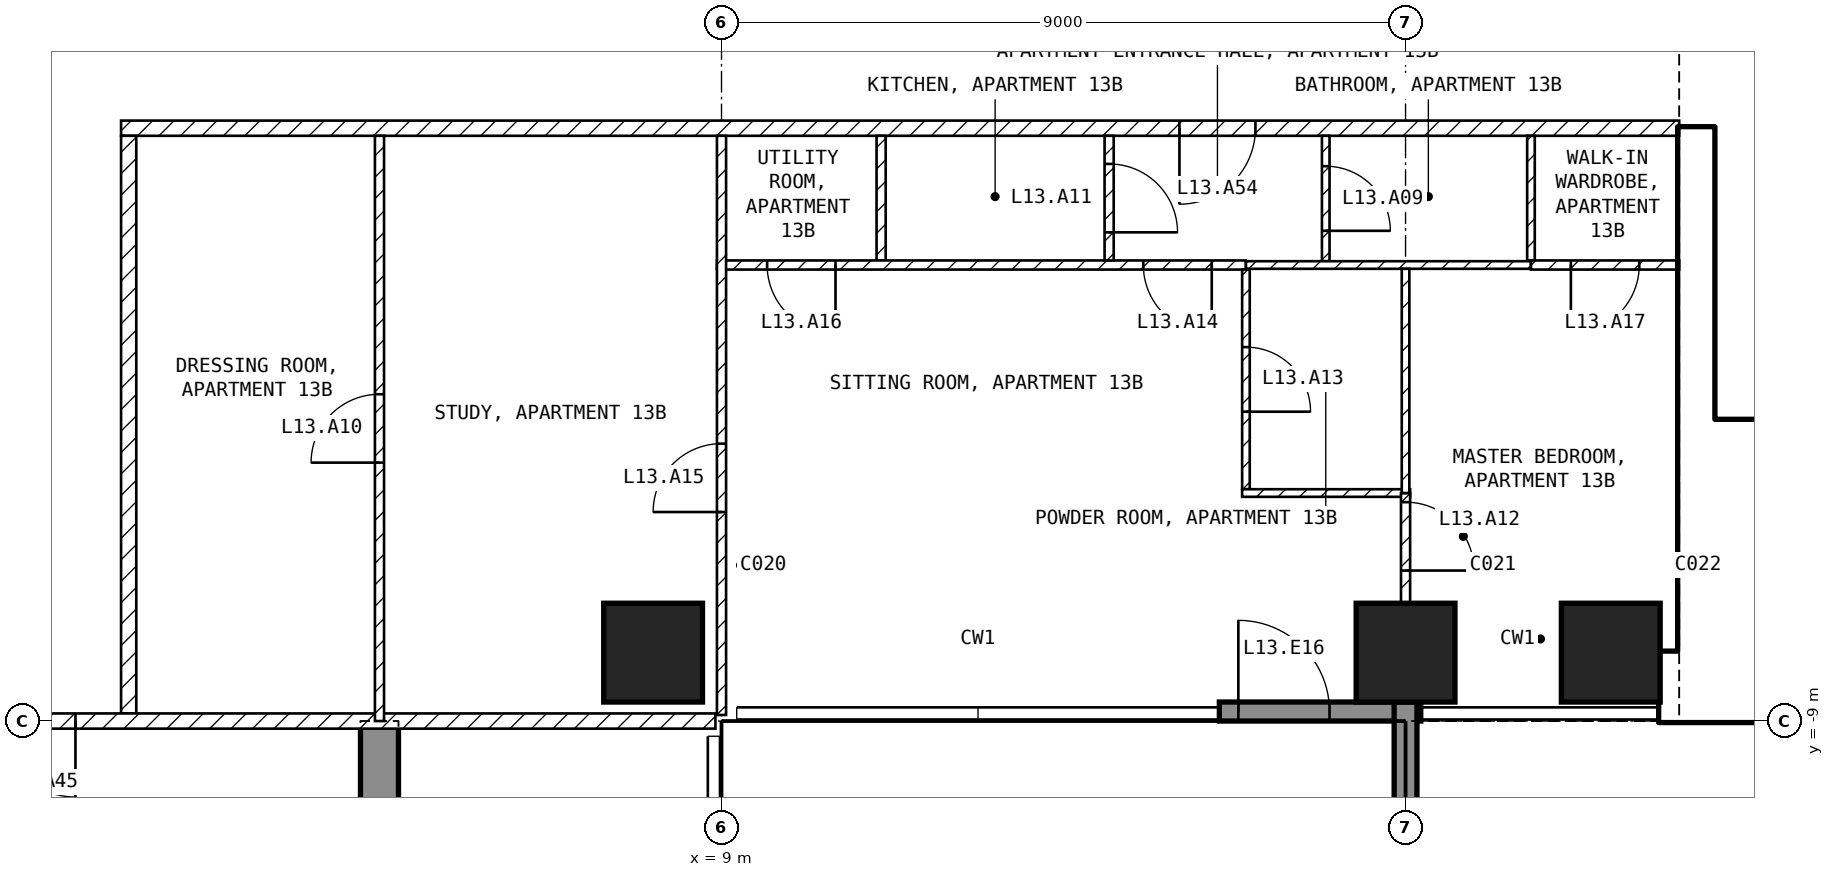
"""IFC4 building model, lengths in metres.
Left out: names, types, materials, properties, quantities, classifications, styles, units other than length and angle.
Written with IfcOpenShell. Run it as: python <this file> out.ifc"""

import sys

from ifc_helpers import new_model, si_unit, direction, frame, frame_2d, origin, origin_2d, place, context, subcontext, project, spatial, polyline, rectangle, outline, extrude, element, fill, save


model = new_model("IFC4")
c1 = context("Model", 3, precision=1e-05, world=origin(), true_north=direction((0.0, 1.0)))
c2 = subcontext(c1, "Body", "Model", "MODEL_VIEW")
j1 = project(units=[si_unit("LENGTHUNIT", "METRE"), si_unit("PLANEANGLEUNIT", "RADIAN")], contexts=[c1])
p1 = place(None, origin())
s1 = spatial("IfcSite", under=j1, at=p1, CompositionType="ELEMENT")
p2 = place(p1, origin())
s2 = spatial("IfcBuilding", under=s1, at=p2, CompositionType="ELEMENT")
p3 = place(p2, frame((0.0, 0.0, 64.5)))
s3 = spatial("IfcBuildingStorey", under=s2, at=p3, CompositionType="ELEMENT", Elevation=64.5)
for number, where, z_axis, x_axis in (
    (1, (8.1, -8.1, -0.25), (0.0, 0.0, 1.0), (1.0, 0.0, 0.0)),
    (2, (18.0, -8.1, -0.25), (0.0, 0.0, 1.0), (1.0, 0.0, 0.0)),
    (3, (20.7, -8.1, -0.25), (0.0, 0.0, 1.0), (1.0, 0.0, 0.0)),
):
    element("IfcColumn", number, at=place(p3, frame(where, z_axis=z_axis, x_axis=x_axis)), inside=s3, PredefinedType="COLUMN", context=c2, shape_type="SweptSolid", body=[
        extrude(rectangle(XDim=1.3, YDim=1.3, at=origin_2d()), origin(), (0.0, 0.0, 1.0), 3.5),
    ])
p4 = place(p3, frame((4.25, -25.45, -0.25), z_axis=(1.0, 0.0, 0.0), x_axis=(0.0, 1.0, 0.0)))
e4 = element("IfcWall", 4, at=p4, inside=s3, PredefinedType="SHEAR", context=c2, shape_type="SweptSolid", body=[
    extrude(outline(polyline([(0.0, 0.0), (4.15, 0.0), (4.15, 2.65), (6.55, 2.65), (6.55, 0.0), (11.95, 0.0), (11.95, 2.65), (14.35, 2.65), (14.35, 0.0), (16.45, 0.0), (16.45, 3.5), (0.0, 3.5), (0.0, 0.0)])), origin(), (0.0, 0.0, 1.0), 0.5),
])
p5 = place(p3, frame((15.55, -8.875, 0.0), z_axis=(0.0, 0.0, 1.0), x_axis=(1.0, 0.0, 0.0)))
e5 = element("IfcWall", 5, at=p5, inside=s3, PredefinedType="SOLIDWALL", context=c2, shape_type="SweptSolid", body=[
    extrude(rectangle(XDim=2.65, YDim=0.25, at=frame_2d((1.325, 0.0))), origin(), (0.0, 0.0, 1.0), 3.25),
])
p6 = place(p5, frame((0.25, 0.0, 0.0)))
e6 = element("IfcOpeningElement", 6, at=p6, cuts=e5, PredefinedType="OPENING", context=c2, shape_type="SweptSolid", body=[
    extrude(rectangle(XDim=1.2, YDim=2.4, at=frame_2d((0.6, 1.2))), frame((0.0, 0.135, 0.0), z_axis=(0.0, -1.0, 0.0), x_axis=(1.0, 0.0, 0.0)), (0.0, 0.0, 1.0), 0.27),
])
p7 = place(p3, frame((18.0, -8.75, 0.0), z_axis=(0.0, 0.0, 1.0), x_axis=(0.0, -1.0, 0.0)))
e7 = element("IfcWall", 7, at=p7, inside=s3, PredefinedType="SOLIDWALL", context=c2, shape_type="SweptSolid", body=[
    extrude(rectangle(XDim=2.95, YDim=0.3, at=frame_2d((1.475, 0.0))), origin(), (0.0, 0.0, 1.0), 3.25),
])
p8 = place(p3, frame((21.35, -8.55, 0.0), z_axis=(0.0, 0.0, 1.0), x_axis=(1.0, 0.0, 0.0)))
e8 = element("IfcWall", 8, at=p8, inside=s3, PredefinedType="SHEAR", context=c2, shape_type="SweptSolid", body=[
    extrude(rectangle(XDim=11.05, YDim=0.9, at=frame_2d((5.525, 0.0))), origin(), (0.0, 0.0, 1.0), 3.25),
])
p9 = place(p3, frame((21.825, -8.1, 0.0), z_axis=(0.0, 0.0, 1.0), x_axis=(0.0, 1.0, 0.0)))
e9 = element("IfcWall", 9, at=p9, inside=s3, PredefinedType="SHEAR", context=c2, shape_type="SweptSolid", body=[
    extrude(rectangle(XDim=6.9, YDim=0.45, at=frame_2d((3.45, 0.0))), origin(), (0.0, 0.0, 1.0), 3.25),
])
p10 = place(p3, frame((22.05, -5.15, 0.0), z_axis=(0.0, 0.0, 1.0), x_axis=(1.0, 0.0, 0.0)))
e10 = element("IfcWall", 10, at=p10, inside=s3, PredefinedType="SOLIDWALL", context=c2, shape_type="SweptSolid", body=[
    extrude(rectangle(XDim=6.3, YDim=0.2, at=frame_2d((3.15, 0.0))), origin(), (0.0, 0.0, 1.0), 3.25),
])
p11 = place(p10, frame((0.2, 0.0, 0.0)))
e11 = element("IfcOpeningElement", 11, at=p11, cuts=e10, PredefinedType="OPENING", context=c2, shape_type="SweptSolid", body=[
    extrude(rectangle(XDim=1.0, YDim=2.1, at=frame_2d((0.5, 1.05))), frame((0.0, 0.11, 0.0), z_axis=(0.0, -1.0, 0.0), x_axis=(1.0, 0.0, 0.0)), (0.0, 0.0, 1.0), 0.22),
])
p12 = place(p3, frame((21.6, -1.2, 0.0), z_axis=(0.0, 0.0, 1.0), x_axis=(-1.0, 0.0, 0.0)))
e12 = element("IfcWall", 12, at=p12, inside=s3, PredefinedType="PARTITIONING", context=c2, shape_type="SweptSolid", body=[
    extrude(rectangle(XDim=20.5, YDim=0.2, at=frame_2d((10.25, 0.0))), origin(), (0.0, 0.0, 1.0), 3.25),
])
p13 = place(p12, frame((5.575, 0.0, 0.0)))
e13 = element("IfcOpeningElement", 13, at=p13, cuts=e12, PredefinedType="OPENING", context=c2, shape_type="SweptSolid", body=[
    extrude(rectangle(XDim=1.0, YDim=2.1, at=frame_2d((0.5, 1.05))), frame((0.0, 0.11, 0.0), z_axis=(0.0, -1.0, 0.0), x_axis=(1.0, 0.0, 0.0)), (0.0, 0.0, 1.0), 0.22),
])
p14 = place(p3, frame((1.2, -1.3, 0.0), z_axis=(0.0, 0.0, 1.0), x_axis=(0.0, -1.0, 0.0)))
e14 = element("IfcWall", 14, at=p14, inside=s3, PredefinedType="PARTITIONING", context=c2, shape_type="SweptSolid", body=[
    extrude(rectangle(XDim=7.6, YDim=0.2, at=frame_2d((3.8, 0.0))), origin(), (0.0, 0.0, 1.0), 3.25),
])
p15 = place(p3, frame((8.92, -9.0, 0.0), z_axis=(0.0, 0.0, 1.0), x_axis=(-1.0, 0.0, 0.0)))
e15 = element("IfcWall", 15, at=p15, inside=s3, PredefinedType="PARTITIONING", context=c2, shape_type="SweptSolid", body=[
    extrude(rectangle(XDim=17.84, YDim=0.2, at=frame_2d((8.92, 0.0))), origin(), (0.0, 0.0, 1.0), 3.25),
])
p16 = place(p15, frame((8.42, 0.0, 0.0)))
e16 = element("IfcOpeningElement", 16, at=p16, cuts=e15, PredefinedType="OPENING", context=c2, shape_type="SweptSolid", body=[
    extrude(rectangle(XDim=1.0, YDim=2.1, at=frame_2d((0.5, 1.05))), frame((0.0, 0.11, 0.0), z_axis=(0.0, -1.0, 0.0), x_axis=(1.0, 0.0, 0.0)), (0.0, 0.0, 1.0), 0.22),
])
p17 = place(p3, frame((11.1, -1.3, 0.0), z_axis=(0.0, 0.0, 1.0), x_axis=(0.0, -1.0, 0.0)))
e17 = element("IfcWall", 17, at=p17, inside=s3, PredefinedType="PARTITIONING", context=c2, shape_type="SweptSolid", body=[
    extrude(rectangle(XDim=1.64, YDim=0.12, at=frame_2d((0.82, 0.0))), origin(), (0.0, 0.0, 1.0), 3.25),
])
p18 = place(p3, frame((15.9, -3.0, 0.0), z_axis=(0.0, 0.0, 1.0), x_axis=(-1.0, 0.0, 0.0)))
e18 = element("IfcWall", 18, at=p18, inside=s3, PredefinedType="PARTITIONING", context=c2, shape_type="SweptSolid", body=[
    extrude(rectangle(XDim=6.96, YDim=0.12, at=frame_2d((3.48, 0.0))), origin(), (0.0, 0.0, 1.0), 3.25),
])
p19 = place(p18, frame((0.45, 0.0, 0.0)))
e19 = element("IfcOpeningElement", 19, at=p19, cuts=e18, PredefinedType="OPENING", context=c2, shape_type="SweptSolid", body=[
    extrude(rectangle(XDim=0.9, YDim=2.1, at=frame_2d((0.45, 1.05))), frame((0.0, 0.07, 0.0), z_axis=(0.0, -1.0, 0.0), x_axis=(1.0, 0.0, 0.0)), (0.0, 0.0, 1.0), 0.14),
])
p20 = place(p18, frame((5.4, 0.0, 0.0)))
e20 = element("IfcOpeningElement", 20, at=p20, cuts=e18, PredefinedType="OPENING", context=c2, shape_type="SweptSolid", body=[
    extrude(rectangle(XDim=0.9, YDim=2.1, at=frame_2d((0.45, 1.05))), frame((0.0, 0.07, 0.0), z_axis=(0.0, -1.0, 0.0), x_axis=(1.0, 0.0, 0.0)), (0.0, 0.0, 1.0), 0.14),
])
p21 = place(p3, frame((9.0, -8.92, 0.0), z_axis=(0.0, 0.0, 1.0), x_axis=(0.0, 1.0, 0.0)))
e21 = element("IfcWall", 21, at=p21, inside=s3, PredefinedType="PARTITIONING", context=c2, shape_type="SweptSolid", body=[
    extrude(rectangle(XDim=7.62, YDim=0.12, at=frame_2d((3.81, 0.0))), origin(), (0.0, 0.0, 1.0), 3.25),
])
p22 = place(p21, frame((2.67, 0.0, 0.0)))
e22 = element("IfcOpeningElement", 22, at=p22, cuts=e21, PredefinedType="OPENING", context=c2, shape_type="SweptSolid", body=[
    extrude(rectangle(XDim=0.9, YDim=2.1, at=frame_2d((0.45, 1.05))), frame((0.0, 0.07, 0.0), z_axis=(0.0, -1.0, 0.0), x_axis=(1.0, 0.0, 0.0)), (0.0, 0.0, 1.0), 0.14),
])
p23 = place(p3, frame((14.1, -1.3, 0.0), z_axis=(0.0, 0.0, 1.0), x_axis=(0.0, -1.0, 0.0)))
e23 = element("IfcWall", 23, at=p23, inside=s3, PredefinedType="PARTITIONING", context=c2, shape_type="SweptSolid", body=[
    extrude(rectangle(XDim=1.64, YDim=0.12, at=frame_2d((0.82, 0.0))), origin(), (0.0, 0.0, 1.0), 3.25),
])
p24 = place(p23, frame((0.37, 0.0, 0.0)))
e24 = element("IfcOpeningElement", 24, at=p24, cuts=e23, PredefinedType="OPENING", context=c2, shape_type="SweptSolid", body=[
    extrude(rectangle(XDim=0.9, YDim=2.1, at=frame_2d((0.45, 1.05))), frame((0.0, 0.07, 0.0), z_axis=(0.0, -1.0, 0.0), x_axis=(1.0, 0.0, 0.0)), (0.0, 0.0, 1.0), 0.14),
])
p25 = place(p3, frame((16.95, -1.3, 0.0), z_axis=(0.0, 0.0, 1.0), x_axis=(0.0, -1.0, 0.0)))
e25 = element("IfcWall", 25, at=p25, inside=s3, PredefinedType="PARTITIONING", context=c2, shape_type="SweptSolid", body=[
    extrude(rectangle(XDim=1.65, YDim=0.1, at=frame_2d((0.825, 0.0))), origin(), (0.0, 0.0, 1.0), 3.25),
])
p26 = place(p25, frame((0.4, 0.0, 0.0)))
e26 = element("IfcOpeningElement", 26, at=p26, cuts=e25, PredefinedType="OPENING", context=c2, shape_type="SweptSolid", body=[
    extrude(rectangle(XDim=0.85, YDim=2.1, at=frame_2d((0.425, 1.05))), frame((0.0, 0.06, 0.0), z_axis=(0.0, -1.0, 0.0), x_axis=(1.0, 0.0, 0.0)), (0.0, 0.0, 1.0), 0.12),
])
p27 = place(p3, frame((19.65, -3.0, 0.0), z_axis=(0.0, 0.0, 1.0), x_axis=(-1.0, 0.0, 0.0)))
e27 = element("IfcWall", 27, at=p27, inside=s3, PredefinedType="PARTITIONING", context=c2, shape_type="SweptSolid", body=[
    extrude(rectangle(XDim=3.75, YDim=0.1, at=frame_2d((1.875, 0.0))), origin(), (0.0, 0.0, 1.0), 3.25),
])
p28 = place(p3, frame((19.65, -1.3, 0.0), z_axis=(0.0, 0.0, 1.0), x_axis=(0.0, -1.0, 0.0)))
e28 = element("IfcWall", 28, at=p28, inside=s3, PredefinedType="PARTITIONING", context=c2, shape_type="SweptSolid", body=[
    extrude(rectangle(XDim=1.64, YDim=0.1, at=frame_2d((0.82, 0.0))), origin(), (0.0, 0.0, 1.0), 3.25),
])
p29 = place(p3, frame((21.6, -3.0, 0.0), z_axis=(0.0, 0.0, 1.0), x_axis=(-1.0, 0.0, 0.0)))
e29 = element("IfcWall", 29, at=p29, inside=s3, PredefinedType="PARTITIONING", context=c2, shape_type="SweptSolid", body=[
    extrude(rectangle(XDim=1.95, YDim=0.12, at=frame_2d((0.975, 0.0))), origin(), (0.0, 0.0, 1.0), 3.25),
])
p30 = place(p29, frame((0.525, 0.0, 0.0)))
e30 = element("IfcOpeningElement", 30, at=p30, cuts=e29, PredefinedType="OPENING", context=c2, shape_type="SweptSolid", body=[
    extrude(rectangle(XDim=0.9, YDim=2.1, at=frame_2d((0.45, 1.05))), frame((0.0, 0.07, 0.0), z_axis=(0.0, -1.0, 0.0), x_axis=(1.0, 0.0, 0.0)), (0.0, 0.0, 1.0), 0.14),
])
p31 = place(p3, frame((15.9, -3.06, 0.0), z_axis=(0.0, 0.0, 1.0), x_axis=(0.0, -1.0, 0.0)))
e31 = element("IfcWall", 31, at=p31, inside=s3, PredefinedType="PARTITIONING", context=c2, shape_type="SweptSolid", body=[
    extrude(rectangle(XDim=2.89, YDim=0.1, at=frame_2d((1.445, 0.0))), origin(), (0.0, 0.0, 1.0), 3.25),
])
p32 = place(p31, frame((1.02, 0.0, 0.0)))
e32 = element("IfcOpeningElement", 32, at=p32, cuts=e31, PredefinedType="OPENING", context=c2, shape_type="SweptSolid", body=[
    extrude(rectangle(XDim=0.85, YDim=2.1, at=frame_2d((0.425, 1.05))), frame((0.0, 0.06, 0.0), z_axis=(0.0, -1.0, 0.0), x_axis=(1.0, 0.0, 0.0)), (0.0, 0.0, 1.0), 0.12),
])
p33 = place(p3, frame((15.85, -6.0, 0.0), z_axis=(0.0, 0.0, 1.0), x_axis=(1.0, 0.0, 0.0)))
e33 = element("IfcWall", 33, at=p33, inside=s3, PredefinedType="PARTITIONING", context=c2, shape_type="SweptSolid", body=[
    extrude(rectangle(XDim=2.21, YDim=0.1, at=frame_2d((1.105, 0.0))), origin(), (0.0, 0.0, 1.0), 3.25),
])
p34 = place(p3, frame((18.0, -6.0, 0.0), z_axis=(0.0, 0.0, 1.0), x_axis=(0.0, -1.0, 0.0)))
e34 = element("IfcWall", 34, at=p34, inside=s3, PredefinedType="PARTITIONING", context=c2, shape_type="SweptSolid", body=[
    extrude(rectangle(XDim=1.45, YDim=0.12, at=frame_2d((0.725, 0.0))), origin(), (0.0, 0.0, 1.0), 2.346),
])
p35 = place(p34, frame((0.12, 0.0, 0.0)))
e35 = element("IfcOpeningElement", 35, at=p35, cuts=e34, PredefinedType="OPENING", context=c2, shape_type="SweptSolid", body=[
    extrude(rectangle(XDim=0.9, YDim=2.1, at=frame_2d((0.45, 1.05))), frame((0.0, 0.07, 0.0), z_axis=(0.0, -1.0, 0.0), x_axis=(1.0, 0.0, 0.0)), (0.0, 0.0, 1.0), 0.14),
])
p36 = place(p3, frame((18.0, -3.05, 0.0), z_axis=(0.0, 0.0, 1.0), x_axis=(0.0, -1.0, 0.0)))
e36 = element("IfcWall", 36, at=p36, inside=s3, PredefinedType="PARTITIONING", context=c2, shape_type="SweptSolid", body=[
    extrude(rectangle(XDim=2.95, YDim=0.1, at=frame_2d((1.475, 0.0))), origin(), (0.0, 0.0, 1.0), 2.346),
])
p37 = place(p3, frame((4.5, -9.0, 0.0), z_axis=(0.0, 0.0, 1.0), x_axis=(0.0, 1.0, 0.0)))
e37 = element("IfcWall", 37, at=p37, inside=s3, PredefinedType="PARTITIONING", context=c2, shape_type="SweptSolid", body=[
    extrude(rectangle(XDim=7.7, YDim=0.12, at=frame_2d((3.85, 0.0))), origin(), (0.0, 0.0, 1.0), 3.25),
])
p38 = place(p37, frame((3.4, 0.0, 0.0)))
e38 = element("IfcOpeningElement", 38, at=p38, cuts=e37, PredefinedType="OPENING", context=c2, shape_type="SweptSolid", body=[
    extrude(rectangle(XDim=0.9, YDim=2.1, at=frame_2d((0.45, 1.05))), frame((0.0, 0.07, 0.0), z_axis=(0.0, -1.0, 0.0), x_axis=(1.0, 0.0, 0.0)), (0.0, 0.0, 1.0), 0.14),
])
p39 = place(p6, origin())
e39 = element("IfcDoor", 39, at=p39, inside=s3, OperationType="SINGLE_SWING_LEFT", PredefinedType="DOOR", context=c2, shape_type="SweptSolid", body=[
    extrude(rectangle(XDim=1.2, YDim=2.4, at=frame_2d((0.6, 1.2))), frame((0.0, 0.025, 0.0), z_axis=(0.0, -1.0, 0.0), x_axis=(1.0, 0.0, 0.0)), (0.0, 0.0, 1.0), 0.05),
])
fill(e6, e39)
p40 = place(p11, origin())
e40 = element("IfcDoor", 40, at=p40, inside=s3, OperationType="SINGLE_SWING_LEFT", PredefinedType="DOOR", context=c2, shape_type="SweptSolid", body=[
    extrude(rectangle(XDim=1.0, YDim=2.1, at=frame_2d((0.5, 1.05))), frame((0.0, 0.025, 0.0), z_axis=(0.0, -1.0, 0.0), x_axis=(1.0, 0.0, 0.0)), (0.0, 0.0, 1.0), 0.05),
])
fill(e11, e40)
p41 = place(p26, origin())
e41 = element("IfcDoor", 41, at=p41, inside=s3, OperationType="SINGLE_SWING_RIGHT", PredefinedType="DOOR", context=c2, shape_type="SweptSolid", body=[
    extrude(rectangle(XDim=0.85, YDim=2.1, at=frame_2d((0.425, 1.05))), frame((0.0, 0.025, 0.0), z_axis=(0.0, -1.0, 0.0), x_axis=(1.0, 0.0, 0.0)), (0.0, 0.0, 1.0), 0.05),
])
fill(e26, e41)
p42 = place(p38, origin())
e42 = element("IfcDoor", 42, at=p42, inside=s3, OperationType="SINGLE_SWING_LEFT", PredefinedType="DOOR", context=c2, shape_type="SweptSolid", body=[
    extrude(rectangle(XDim=0.9, YDim=2.1, at=frame_2d((0.45, 1.05))), frame((0.0, 0.025, 0.0), z_axis=(0.0, -1.0, 0.0), x_axis=(1.0, 0.0, 0.0)), (0.0, 0.0, 1.0), 0.05),
])
fill(e38, e42)
p43 = place(p24, origin())
e43 = element("IfcDoor", 43, at=p43, inside=s3, OperationType="SINGLE_SWING_RIGHT", PredefinedType="DOOR", context=c2, shape_type="SweptSolid", body=[
    extrude(rectangle(XDim=0.9, YDim=2.1, at=frame_2d((0.45, 1.05))), frame((0.0, 0.025, 0.0), z_axis=(0.0, -1.0, 0.0), x_axis=(1.0, 0.0, 0.0)), (0.0, 0.0, 1.0), 0.05),
])
fill(e24, e43)
p44 = place(p35, origin())
e44 = element("IfcDoor", 44, at=p44, inside=s3, OperationType="SINGLE_SWING_RIGHT", PredefinedType="DOOR", context=c2, shape_type="SweptSolid", body=[
    extrude(rectangle(XDim=0.9, YDim=2.1, at=frame_2d((0.45, 1.05))), frame((0.0, 0.025, 0.0), z_axis=(0.0, -1.0, 0.0), x_axis=(1.0, 0.0, 0.0)), (0.0, 0.0, 1.0), 0.05),
])
fill(e35, e44)
p45 = place(p32, origin())
e45 = element("IfcDoor", 45, at=p45, inside=s3, OperationType="SINGLE_SWING_RIGHT", PredefinedType="DOOR", context=c2, shape_type="SweptSolid", body=[
    extrude(rectangle(XDim=0.85, YDim=2.1, at=frame_2d((0.425, 1.05))), frame((0.0, 0.025, 0.0), z_axis=(0.0, -1.0, 0.0), x_axis=(1.0, 0.0, 0.0)), (0.0, 0.0, 1.0), 0.05),
])
fill(e32, e45)
p46 = place(p19, origin())
e46 = element("IfcDoor", 46, at=p46, inside=s3, OperationType="SINGLE_SWING_LEFT", PredefinedType="DOOR", context=c2, shape_type="SweptSolid", body=[
    extrude(rectangle(XDim=0.9, YDim=2.1, at=frame_2d((0.45, 1.05))), frame((0.0, 0.025, 0.0), z_axis=(0.0, -1.0, 0.0), x_axis=(1.0, 0.0, 0.0)), (0.0, 0.0, 1.0), 0.05),
])
fill(e19, e46)
p47 = place(p22, origin())
e47 = element("IfcDoor", 47, at=p47, inside=s3, OperationType="SINGLE_SWING_LEFT", PredefinedType="DOOR", context=c2, shape_type="SweptSolid", body=[
    extrude(rectangle(XDim=0.9, YDim=2.1, at=frame_2d((0.45, 1.05))), frame((0.0, 0.025, 0.0), z_axis=(0.0, -1.0, 0.0), x_axis=(1.0, 0.0, 0.0)), (0.0, 0.0, 1.0), 0.05),
])
fill(e22, e47)
p48 = place(p20, origin())
e48 = element("IfcDoor", 48, at=p48, inside=s3, OperationType="SINGLE_SWING_LEFT", PredefinedType="DOOR", context=c2, shape_type="SweptSolid", body=[
    extrude(rectangle(XDim=0.9, YDim=2.1, at=frame_2d((0.45, 1.05))), frame((0.0, 0.025, 0.0), z_axis=(0.0, -1.0, 0.0), x_axis=(1.0, 0.0, 0.0)), (0.0, 0.0, 1.0), 0.05),
])
fill(e20, e48)
p49 = place(p30, origin())
e49 = element("IfcDoor", 49, at=p49, inside=s3, OperationType="SINGLE_SWING_RIGHT", PredefinedType="DOOR", context=c2, shape_type="SweptSolid", body=[
    extrude(rectangle(XDim=0.9, YDim=2.1, at=frame_2d((0.45, 1.05))), frame((0.0, 0.025, 0.0), z_axis=(0.0, -1.0, 0.0), x_axis=(1.0, 0.0, 0.0)), (0.0, 0.0, 1.0), 0.05),
])
fill(e30, e49)
p50 = place(p16, origin())
e50 = element("IfcDoor", 50, at=p50, inside=s3, OperationType="SINGLE_SWING_LEFT", PredefinedType="DOOR", context=c2, shape_type="SweptSolid", body=[
    extrude(rectangle(XDim=1.0, YDim=2.1, at=frame_2d((0.5, 1.05))), frame((0.0, 0.025, 0.0), z_axis=(0.0, -1.0, 0.0), x_axis=(1.0, 0.0, 0.0)), (0.0, 0.0, 1.0), 0.05),
])
fill(e16, e50)
p51 = place(p13, origin())
e51 = element("IfcDoor", 51, at=p51, inside=s3, OperationType="SINGLE_SWING_RIGHT", PredefinedType="DOOR", context=c2, shape_type="SweptSolid", body=[
    extrude(rectangle(XDim=1.0, YDim=2.1, at=frame_2d((0.5, 1.05))), frame((0.0, 0.025, 0.0), z_axis=(0.0, -1.0, 0.0), x_axis=(1.0, 0.0, 0.0)), (0.0, 0.0, 1.0), 0.05),
])
fill(e13, e51)
save(model, sys.argv[1])
